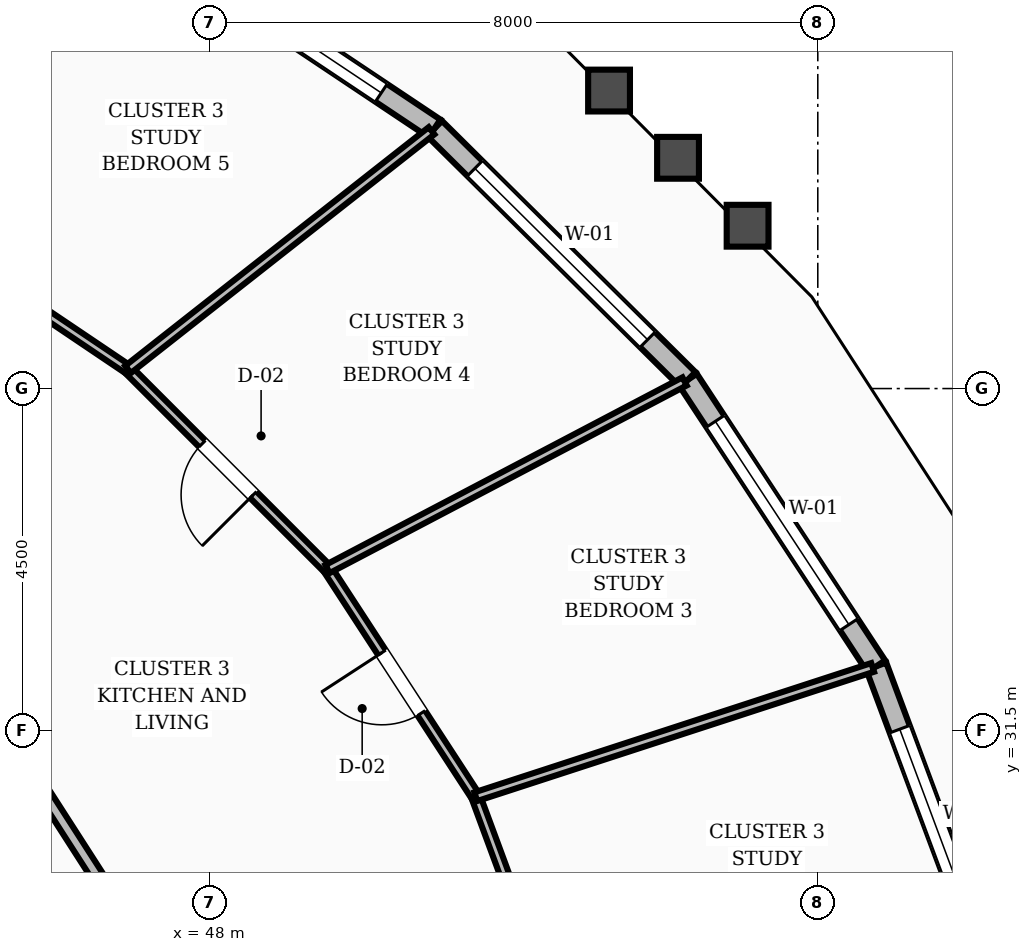
"""IFC4 building model, lengths in metres.
Left out: names, types, materials, properties, quantities, classifications, styles, units other than length and angle.
Written with IfcOpenShell. Run it as: python <this file> out.ifc"""

import sys

from ifc_helpers import new_model, si_unit, direction, frame, frame_2d, origin, place, context, subcontext, project, spatial, rectangle, extrude, element, fill, save


model = new_model("IFC4")
c1 = context("Model", 3, precision=1e-05, world=origin(), true_north=direction((0.0, 1.0)))
c2 = subcontext(c1, "Body", "Model", "MODEL_VIEW")
j1 = project(units=[si_unit("LENGTHUNIT", "METRE"), si_unit("PLANEANGLEUNIT", "RADIAN")], contexts=[c1])
p1 = place(None, origin())
s1 = spatial("IfcSite", under=j1, at=p1, CompositionType="ELEMENT")
p2 = place(p1, origin())
s2 = spatial("IfcBuilding", under=s1, at=p2, CompositionType="ELEMENT")
p3 = place(p2, frame((0.0, 0.0, 62.8)))
s3 = spatial("IfcBuildingStorey", under=s2, at=p3, CompositionType="ELEMENT", Elevation=62.8)
p4 = place(p3, frame((58.295, 28.255, 0.0), z_axis=(0.0, 0.0, 1.0), x_axis=(-0.349376625654, 0.936982376273, 0.0)))
e1 = element("IfcWall", 1, at=p4, inside=s3, PredefinedType="STANDARD", context=c2, shape_type="SweptSolid", body=[
    extrude(rectangle(XDim=4.367, YDim=0.28, at=frame_2d((2.183, 0.0))), origin(), (0.0, 0.0, 1.0), 2.71),
])
p5 = place(p4, frame((0.883, 0.0, 0.8)))
e2 = element("IfcOpeningElement", 2, at=p5, cuts=e1, PredefinedType="OPENING", context=c2, shape_type="SweptSolid", body=[
    extrude(rectangle(XDim=2.6, YDim=1.65, at=frame_2d((1.3, 0.825))), frame((0.0, 0.15, 0.0), z_axis=(0.0, -1.0, 0.0), x_axis=(1.0, 0.0, 0.0)), (0.0, 0.0, 1.0), 0.3),
])
p6 = place(p3, frame((56.769, 32.346, 0.0), z_axis=(0.0, 0.0, 1.0), x_axis=(-0.54914333256, 0.835728185659, 0.0)))
e3 = element("IfcWall", 3, at=p6, inside=s3, PredefinedType="STANDARD", context=c2, shape_type="SweptSolid", body=[
    extrude(rectangle(XDim=4.512, YDim=0.28, at=frame_2d((2.256, 0.0))), origin(), (0.0, 0.0, 1.0), 2.71),
])
p7 = place(p6, frame((0.656, 0.0, 0.8)))
e4 = element("IfcOpeningElement", 4, at=p7, cuts=e3, PredefinedType="OPENING", context=c2, shape_type="SweptSolid", body=[
    extrude(rectangle(XDim=3.2, YDim=1.65, at=frame_2d((1.6, 0.825))), frame((0.0, 0.15, 0.0), z_axis=(0.0, -1.0, 0.0), x_axis=(1.0, 0.0, 0.0)), (0.0, 0.0, 1.0), 0.3),
])
p8 = place(p3, frame((54.292, 36.117, 0.0), z_axis=(0.0, 0.0, 1.0), x_axis=(-0.710194142887, 0.704005880238, 0.0)))
e5 = element("IfcWall", 5, at=p8, inside=s3, PredefinedType="STANDARD", context=c2, shape_type="SweptSolid", body=[
    extrude(rectangle(XDim=4.695, YDim=0.28, at=frame_2d((2.347, 0.0))), origin(), (0.0, 0.0, 1.0), 2.71),
])
p9 = place(p8, frame((0.747, 0.0, 0.8)))
e6 = element("IfcOpeningElement", 6, at=p9, cuts=e5, PredefinedType="OPENING", context=c2, shape_type="SweptSolid", body=[
    extrude(rectangle(XDim=3.2, YDim=1.65, at=frame_2d((1.6, 0.825))), frame((0.0, 0.15, 0.0), z_axis=(0.0, -1.0, 0.0), x_axis=(1.0, 0.0, 0.0)), (0.0, 0.0, 1.0), 0.3),
])
p10 = place(p3, frame((50.958, 39.422, 0.0), z_axis=(0.0, 0.0, 1.0), x_axis=(-0.831665633672, 0.555276754213, 0.0)))
e7 = element("IfcWall", 7, at=p10, inside=s3, PredefinedType="STANDARD", context=c2, shape_type="SweptSolid", body=[
    extrude(rectangle(XDim=4.885, YDim=0.28, at=frame_2d((2.442, 0.0))), origin(), (0.0, 0.0, 1.0), 2.71),
])
p11 = place(p10, frame((0.842, 0.0, 0.8)))
e8 = element("IfcOpeningElement", 8, at=p11, cuts=e7, PredefinedType="OPENING", context=c2, shape_type="SweptSolid", body=[
    extrude(rectangle(XDim=3.2, YDim=1.65, at=frame_2d((1.6, 0.825))), frame((0.0, 0.15, 0.0), z_axis=(0.0, -1.0, 0.0), x_axis=(1.0, 0.0, 0.0)), (0.0, 0.0, 1.0), 0.3),
])
p12 = place(p3, frame((46.828, 29.109, 0.0), z_axis=(0.0, 0.0, 1.0), x_axis=(-0.540595670038, 0.841282545603, 0.0)))
e9 = element("IfcWall", 9, at=p12, inside=s3, PredefinedType="SOLIDWALL", context=c2, shape_type="SweptSolid", body=[
    extrude(rectangle(XDim=2.744, YDim=0.16, at=frame_2d((1.372, 0.0))), origin(), (0.0, 0.0, 1.0), 2.71),
])
p13 = place(p3, frame((52.702, 27.38, 0.0), z_axis=(0.0, 0.0, 1.0), x_axis=(-0.346625885205, 0.938003462523, 0.0)))
e10 = element("IfcWall", 10, at=p13, inside=s3, PredefinedType="PARTITIONING", context=c2, shape_type="SweptSolid", body=[
    extrude(rectangle(XDim=3.465, YDim=0.12, at=frame_2d((1.733, 0.0))), origin(), (0.0, 0.0, 1.0), 2.71),
])
p14 = place(p13, frame((1.258, 0.0, 0.0)))
e11 = element("IfcOpeningElement", 11, at=p14, cuts=e10, PredefinedType="OPENING", context=c2, shape_type="SweptSolid", body=[
    extrude(rectangle(XDim=0.95, YDim=2.1, at=frame_2d((0.475, 1.05))), frame((0.0, 0.07, 0.0), z_axis=(0.0, -1.0, 0.0), x_axis=(1.0, 0.0, 0.0)), (0.0, 0.0, 1.0), 0.14),
])
p15 = place(p3, frame((51.5, 30.631, 0.0), z_axis=(0.0, 0.0, 1.0), x_axis=(-0.545667594134, 0.838001716414, 0.0)))
e12 = element("IfcWall", 12, at=p15, inside=s3, PredefinedType="PARTITIONING", context=c2, shape_type="SweptSolid", body=[
    extrude(rectangle(XDim=3.574, YDim=0.12, at=frame_2d((1.787, 0.0))), origin(), (0.0, 0.0, 1.0), 2.71),
])
p16 = place(p15, frame((1.312, 0.0, 0.0)))
e13 = element("IfcOpeningElement", 13, at=p16, cuts=e12, PredefinedType="OPENING", context=c2, shape_type="SweptSolid", body=[
    extrude(rectangle(XDim=0.95, YDim=2.1, at=frame_2d((0.475, 1.05))), frame((0.0, 0.07, 0.0), z_axis=(0.0, -1.0, 0.0), x_axis=(1.0, 0.0, 0.0)), (0.0, 0.0, 1.0), 0.14),
])
p17 = place(p3, frame((51.5, 30.631, 0.0), z_axis=(0.0, 0.0, 1.0), x_axis=(0.950856820047, 0.309630921856, 0.0)))
e14 = element("IfcWall", 14, at=p17, inside=s3, PredefinedType="PARTITIONING", context=c2, shape_type="SweptSolid", body=[
    extrude(rectangle(XDim=5.491, YDim=0.12, at=frame_2d((2.746, 0.0))), origin(), (0.0, 0.0, 1.0), 2.71),
])
p18 = place(p3, frame((49.55, 33.626, 0.0), z_axis=(0.0, 0.0, 1.0), x_axis=(-0.707041019105, 0.707172537152, 0.0)))
e15 = element("IfcWall", 15, at=p18, inside=s3, PredefinedType="PARTITIONING", context=c2, shape_type="SweptSolid", body=[
    extrude(rectangle(XDim=3.713, YDim=0.12, at=frame_2d((1.856, 0.0))), origin(), (0.0, 0.0, 1.0), 2.71),
])
p19 = place(p18, frame((1.381, 0.0, 0.0)))
e16 = element("IfcOpeningElement", 16, at=p19, cuts=e15, PredefinedType="OPENING", context=c2, shape_type="SweptSolid", body=[
    extrude(rectangle(XDim=0.95, YDim=2.1, at=frame_2d((0.475, 1.05))), frame((0.0, 0.07, 0.0), z_axis=(0.0, -1.0, 0.0), x_axis=(1.0, 0.0, 0.0)), (0.0, 0.0, 1.0), 0.14),
])
p20 = place(p3, frame((49.55, 33.626, 0.0), z_axis=(0.0, 0.0, 1.0), x_axis=(0.885275261797, 0.465067426134, 0.0)))
e17 = element("IfcWall", 17, at=p20, inside=s3, PredefinedType="PARTITIONING", context=c2, shape_type="SweptSolid", body=[
    extrude(rectangle(XDim=5.306, YDim=0.12, at=frame_2d((2.653, 0.0))), origin(), (0.0, 0.0, 1.0), 2.71),
])
p21 = place(p3, frame((46.925, 36.251, 0.0), z_axis=(0.0, 0.0, 1.0), x_axis=(-0.829352517657, 0.558725694286, 0.0)))
e18 = element("IfcWall", 18, at=p21, inside=s3, PredefinedType="PARTITIONING", context=c2, shape_type="SweptSolid", body=[
    extrude(rectangle(XDim=3.857, YDim=0.12, at=frame_2d((1.928, 0.0))), origin(), (0.0, 0.0, 1.0), 2.71),
])
p22 = place(p21, frame((1.453, 0.0, 0.0)))
e19 = element("IfcOpeningElement", 19, at=p22, cuts=e18, PredefinedType="OPENING", context=c2, shape_type="SweptSolid", body=[
    extrude(rectangle(XDim=0.95, YDim=2.1, at=frame_2d((0.475, 1.05))), frame((0.0, 0.07, 0.0), z_axis=(0.0, -1.0, 0.0), x_axis=(1.0, 0.0, 0.0)), (0.0, 0.0, 1.0), 0.14),
])
p23 = place(p3, frame((46.925, 36.251, 0.0), z_axis=(0.0, 0.0, 1.0), x_axis=(0.786111489239, 0.618084724359, 0.0)))
e20 = element("IfcWall", 20, at=p23, inside=s3, PredefinedType="PARTITIONING", context=c2, shape_type="SweptSolid", body=[
    extrude(rectangle(XDim=5.08, YDim=0.12, at=frame_2d((2.54, 0.0))), origin(), (0.0, 0.0, 1.0), 2.71),
])
p24 = place(p3, frame((43.727, 38.406, 0.0), z_axis=(0.0, 0.0, 1.0), x_axis=(0.647592807169, 0.761986585251, 0.0)))
e21 = element("IfcWall", 21, at=p24, inside=s3, PredefinedType="PARTITIONING", context=c2, shape_type="SweptSolid", body=[
    extrude(rectangle(XDim=4.843, YDim=0.12, at=frame_2d((2.421, 0.0))), origin(), (0.0, 0.0, 1.0), 2.71),
])
p25 = place(p5, origin())
e22 = element("IfcWindow", 22, at=p25, inside=s3, PartitioningType="SINGLE_PANEL", PredefinedType="WINDOW", context=c2, shape_type="SweptSolid", body=[
    extrude(rectangle(XDim=2.6, YDim=1.65, at=frame_2d((1.3, 0.825))), frame((0.0, 0.03, 0.0), z_axis=(0.0, -1.0, 0.0), x_axis=(1.0, 0.0, 0.0)), (0.0, 0.0, 1.0), 0.06),
])
fill(e2, e22)
p26 = place(p7, origin())
e23 = element("IfcWindow", 23, at=p26, inside=s3, PartitioningType="SINGLE_PANEL", PredefinedType="WINDOW", context=c2, shape_type="SweptSolid", body=[
    extrude(rectangle(XDim=3.2, YDim=1.65, at=frame_2d((1.6, 0.825))), frame((0.0, 0.03, 0.0), z_axis=(0.0, -1.0, 0.0), x_axis=(1.0, 0.0, 0.0)), (0.0, 0.0, 1.0), 0.06),
])
fill(e4, e23)
p27 = place(p9, origin())
e24 = element("IfcWindow", 24, at=p27, inside=s3, PartitioningType="SINGLE_PANEL", PredefinedType="WINDOW", context=c2, shape_type="SweptSolid", body=[
    extrude(rectangle(XDim=3.2, YDim=1.65, at=frame_2d((1.6, 0.825))), frame((0.0, 0.03, 0.0), z_axis=(0.0, -1.0, 0.0), x_axis=(1.0, 0.0, 0.0)), (0.0, 0.0, 1.0), 0.06),
])
fill(e6, e24)
p28 = place(p11, origin())
e25 = element("IfcWindow", 25, at=p28, inside=s3, PartitioningType="SINGLE_PANEL", PredefinedType="WINDOW", context=c2, shape_type="SweptSolid", body=[
    extrude(rectangle(XDim=3.2, YDim=1.65, at=frame_2d((1.6, 0.825))), frame((0.0, 0.03, 0.0), z_axis=(0.0, -1.0, 0.0), x_axis=(1.0, 0.0, 0.0)), (0.0, 0.0, 1.0), 0.06),
])
fill(e8, e25)
p29 = place(p16, origin())
e26 = element("IfcDoor", 26, at=p29, inside=s3, OperationType="SINGLE_SWING_RIGHT", PredefinedType="DOOR", context=c2, shape_type="SweptSolid", body=[
    extrude(rectangle(XDim=0.95, YDim=2.1, at=frame_2d((0.475, 1.05))), frame((0.0, 0.025, 0.0), z_axis=(0.0, -1.0, 0.0), x_axis=(1.0, 0.0, 0.0)), (0.0, 0.0, 1.0), 0.05),
])
fill(e13, e26)
p30 = place(p19, origin())
e27 = element("IfcDoor", 27, at=p30, inside=s3, OperationType="SINGLE_SWING_LEFT", PredefinedType="DOOR", context=c2, shape_type="SweptSolid", body=[
    extrude(rectangle(XDim=0.95, YDim=2.1, at=frame_2d((0.475, 1.05))), frame((0.0, 0.025, 0.0), z_axis=(0.0, -1.0, 0.0), x_axis=(1.0, 0.0, 0.0)), (0.0, 0.0, 1.0), 0.05),
])
fill(e16, e27)
save(model, sys.argv[1])
